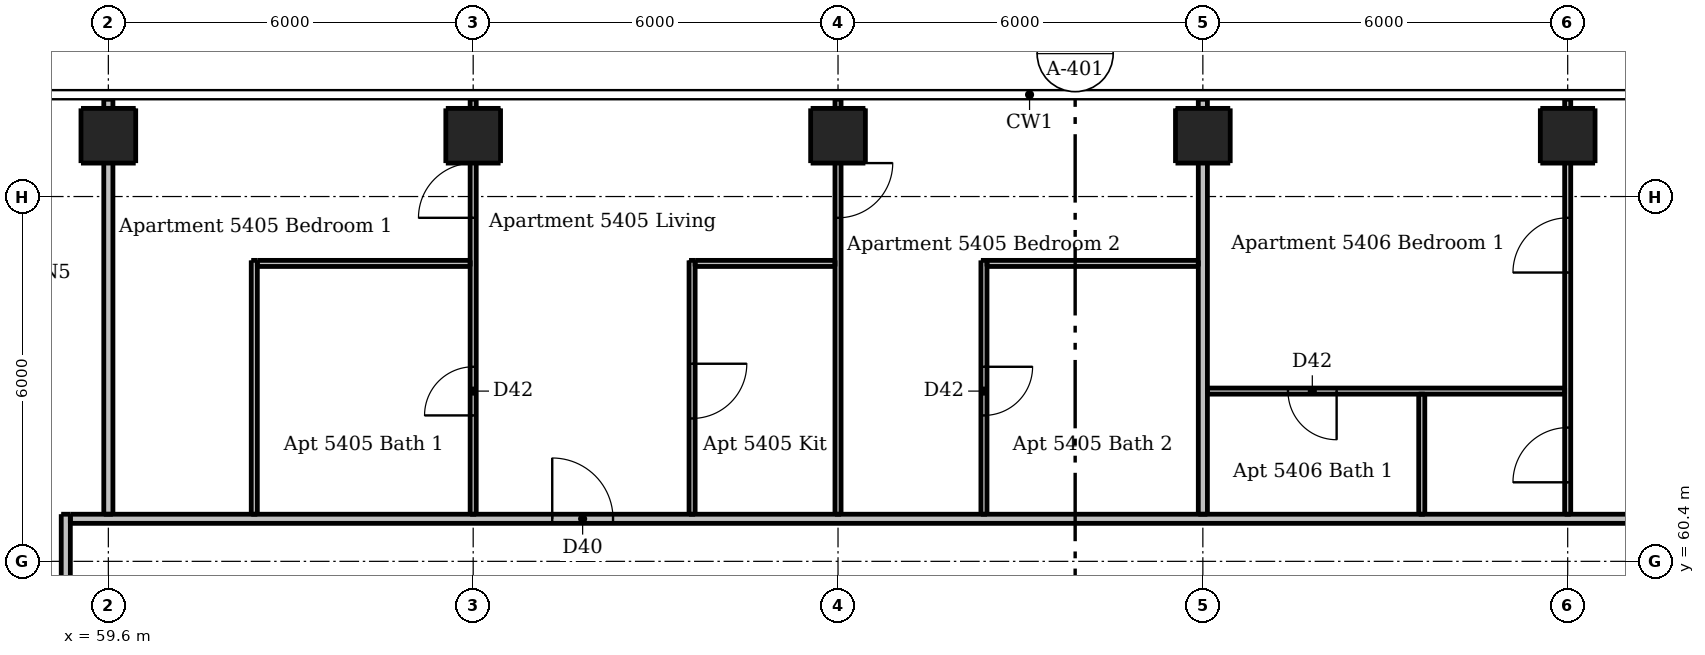
"""IFC4 building model, lengths in metres.
Left out: names, types, materials, properties, quantities, classifications, styles, units other than length and angle.
Written with IfcOpenShell. Run it as: python <this file> out.ifc"""

import sys

from ifc_helpers import new_model, si_unit, direction, frame, frame_2d, origin, origin_2d, place, context, subcontext, project, spatial, rectangle, extrude, element, fill, save


model = new_model("IFC4")
c1 = context("Model", 3, precision=1e-05, world=origin(), true_north=direction((0.0, 1.0)))
c2 = subcontext(c1, "Body", "Model", "MODEL_VIEW")
j1 = project(units=[si_unit("LENGTHUNIT", "METRE"), si_unit("PLANEANGLEUNIT", "RADIAN")], contexts=[c1])
p1 = place(None, origin())
s1 = spatial("IfcSite", under=j1, at=p1, CompositionType="ELEMENT")
p2 = place(p1, origin())
s2 = spatial("IfcBuilding", under=s1, at=p2, CompositionType="ELEMENT")
p3 = place(p2, frame((0.0, 0.0, 203.5)))
s3 = spatial("IfcBuildingStorey", under=s2, at=p3, CompositionType="ELEMENT", Elevation=203.5)
for number, where, z_axis, x_axis in (
    (1, (59.6, 67.4, 0.0), (0.0, 0.0, 1.0), (1.0, 0.0, 0.0)),
    (2, (65.6, 67.4, 0.0), (0.0, 0.0, 1.0), (1.0, 0.0, 0.0)),
    (3, (71.6, 67.4, 0.0), (0.0, 0.0, 1.0), (1.0, 0.0, 0.0)),
    (4, (77.6, 67.4, 0.0), (0.0, 0.0, 1.0), (1.0, 0.0, 0.0)),
    (5, (83.6, 67.4, 0.0), (0.0, 0.0, 1.0), (1.0, 0.0, 0.0)),
):
    element("IfcColumn", number, at=place(p3, frame(where, z_axis=z_axis, x_axis=x_axis)), inside=s3, PredefinedType="COLUMN", context=c2, shape_type="SweptSolid", body=[
        extrude(rectangle(XDim=0.9, YDim=0.9, at=origin_2d()), origin(), (0.0, 0.0, 1.0), 3.05),
    ])
p4 = place(p3, frame((62.0, 61.175, 0.0), z_axis=(0.0, 0.0, 1.0), x_axis=(0.0, 1.0, 0.0)))
e6 = element("IfcWall", 6, at=p4, inside=s3, PredefinedType="PARTITIONING", context=c2, shape_type="SweptSolid", body=[
    extrude(rectangle(XDim=4.175, YDim=0.1, at=frame_2d((2.087, 0.0))), origin(), (0.0, 0.0, 1.0), 3.05),
])
p5 = place(p3, frame((65.6, 61.175, 0.0), z_axis=(0.0, 0.0, 1.0), x_axis=(0.0, 1.0, 0.0)))
e7 = element("IfcWall", 7, at=p5, inside=s3, PredefinedType="PARTITIONING", context=c2, shape_type="SweptSolid", body=[
    extrude(rectangle(XDim=6.825, YDim=0.1, at=frame_2d((3.413, 0.0))), origin(), (0.0, 0.0, 1.0), 2.516),
])
p6 = place(p5, frame((4.875, 0.0, 0.0)))
e8 = element("IfcOpeningElement", 8, at=p6, cuts=e7, PredefinedType="OPENING", context=c2, shape_type="SweptSolid", body=[
    extrude(rectangle(XDim=0.9, YDim=2.1, at=frame_2d((0.45, 1.05))), frame((0.0, 0.06, 0.0), z_axis=(0.0, -1.0, 0.0), x_axis=(1.0, 0.0, 0.0)), (0.0, 0.0, 1.0), 0.12),
])
p7 = place(p5, frame((1.625, 0.0, 0.0)))
e9 = element("IfcOpeningElement", 9, at=p7, cuts=e7, PredefinedType="OPENING", context=c2, shape_type="SweptSolid", body=[
    extrude(rectangle(XDim=0.8, YDim=2.1, at=frame_2d((0.4, 1.05))), frame((0.0, 0.06, 0.0), z_axis=(0.0, -1.0, 0.0), x_axis=(1.0, 0.0, 0.0)), (0.0, 0.0, 1.0), 0.12),
])
p8 = place(p3, frame((69.2, 65.35, 0.0), z_axis=(0.0, 0.0, 1.0), x_axis=(0.0, -1.0, 0.0)))
e10 = element("IfcWall", 10, at=p8, inside=s3, PredefinedType="PARTITIONING", context=c2, shape_type="SweptSolid", body=[
    extrude(rectangle(XDim=4.175, YDim=0.1, at=frame_2d((2.087, 0.0))), origin(), (0.0, 0.0, 1.0), 3.05),
])
p9 = place(p8, frame((1.7, 0.0, 0.0)))
e11 = element("IfcOpeningElement", 11, at=p9, cuts=e10, PredefinedType="OPENING", context=c2, shape_type="SweptSolid", body=[
    extrude(rectangle(XDim=0.9, YDim=2.1, at=frame_2d((0.45, 1.05))), frame((0.0, 0.06, 0.0), z_axis=(0.0, -1.0, 0.0), x_axis=(1.0, 0.0, 0.0)), (0.0, 0.0, 1.0), 0.12),
])
p10 = place(p3, frame((71.6, 68.0, 0.0), z_axis=(0.0, 0.0, 1.0), x_axis=(0.0, -1.0, 0.0)))
e12 = element("IfcWall", 12, at=p10, inside=s3, PredefinedType="PARTITIONING", context=c2, shape_type="SweptSolid", body=[
    extrude(rectangle(XDim=6.825, YDim=0.1, at=frame_2d((3.413, 0.0))), origin(), (0.0, 0.0, 1.0), 2.516),
])
p11 = place(p10, frame((1.05, 0.0, 0.0)))
e13 = element("IfcOpeningElement", 13, at=p11, cuts=e12, PredefinedType="OPENING", context=c2, shape_type="SweptSolid", body=[
    extrude(rectangle(XDim=0.9, YDim=2.1, at=frame_2d((0.45, 1.05))), frame((0.0, 0.06, 0.0), z_axis=(0.0, -1.0, 0.0), x_axis=(1.0, 0.0, 0.0)), (0.0, 0.0, 1.0), 0.12),
])
p12 = place(p3, frame((74.0, 65.35, 0.0), z_axis=(0.0, 0.0, 1.0), x_axis=(0.0, -1.0, 0.0)))
e14 = element("IfcWall", 14, at=p12, inside=s3, PredefinedType="PARTITIONING", context=c2, shape_type="SweptSolid", body=[
    extrude(rectangle(XDim=4.175, YDim=0.1, at=frame_2d((2.087, 0.0))), origin(), (0.0, 0.0, 1.0), 3.05),
])
p13 = place(p12, frame((1.75, 0.0, 0.0)))
e15 = element("IfcOpeningElement", 15, at=p13, cuts=e14, PredefinedType="OPENING", context=c2, shape_type="SweptSolid", body=[
    extrude(rectangle(XDim=0.8, YDim=2.1, at=frame_2d((0.4, 1.05))), frame((0.0, 0.06, 0.0), z_axis=(0.0, -1.0, 0.0), x_axis=(1.0, 0.0, 0.0)), (0.0, 0.0, 1.0), 0.12),
])
p14 = place(p3, frame((81.2, 61.175, 0.0), z_axis=(0.0, 0.0, 1.0), x_axis=(0.0, 1.0, 0.0)))
e16 = element("IfcWall", 16, at=p14, inside=s3, PredefinedType="PARTITIONING", context=c2, shape_type="SweptSolid", body=[
    extrude(rectangle(XDim=1.975, YDim=0.1, at=frame_2d((0.987, 0.0))), origin(), (0.0, 0.0, 1.0), 3.05),
])
p15 = place(p3, frame((83.6, 61.175, 0.0), z_axis=(0.0, 0.0, 1.0), x_axis=(0.0, 1.0, 0.0)))
e17 = element("IfcWall", 17, at=p15, inside=s3, PredefinedType="PARTITIONING", context=c2, shape_type="SweptSolid", body=[
    extrude(rectangle(XDim=6.825, YDim=0.1, at=frame_2d((3.413, 0.0))), origin(), (0.0, 0.0, 1.0), 2.516),
])
p16 = place(p15, frame((0.525, 0.0, 0.0)))
e18 = element("IfcOpeningElement", 18, at=p16, cuts=e17, PredefinedType="OPENING", context=c2, shape_type="SweptSolid", body=[
    extrude(rectangle(XDim=0.9, YDim=2.1, at=frame_2d((0.45, 1.05))), frame((0.0, 0.06, 0.0), z_axis=(0.0, -1.0, 0.0), x_axis=(1.0, 0.0, 0.0)), (0.0, 0.0, 1.0), 0.12),
])
p17 = place(p15, frame((3.975, 0.0, 0.0)))
e19 = element("IfcOpeningElement", 19, at=p17, cuts=e17, PredefinedType="OPENING", context=c2, shape_type="SweptSolid", body=[
    extrude(rectangle(XDim=0.9, YDim=2.1, at=frame_2d((0.45, 1.05))), frame((0.0, 0.06, 0.0), z_axis=(0.0, -1.0, 0.0), x_axis=(1.0, 0.0, 0.0)), (0.0, 0.0, 1.0), 0.12),
])
p18 = place(p3, frame((62.05, 65.3, 0.0), z_axis=(0.0, 0.0, 1.0), x_axis=(1.0, 0.0, 0.0)))
e20 = element("IfcWall", 20, at=p18, inside=s3, PredefinedType="PARTITIONING", context=c2, shape_type="SweptSolid", body=[
    extrude(rectangle(XDim=3.5, YDim=0.1, at=frame_2d((1.75, 0.0))), origin(), (0.0, 0.0, 1.0), 3.05),
])
p19 = place(p3, frame((69.25, 65.3, 0.0), z_axis=(0.0, 0.0, 1.0), x_axis=(1.0, 0.0, 0.0)))
e21 = element("IfcWall", 21, at=p19, inside=s3, PredefinedType="PARTITIONING", context=c2, shape_type="SweptSolid", body=[
    extrude(rectangle(XDim=2.3, YDim=0.1, at=frame_2d((1.15, 0.0))), origin(), (0.0, 0.0, 1.0), 3.05),
])
p20 = place(p3, frame((74.05, 65.3, 0.0), z_axis=(0.0, 0.0, 1.0), x_axis=(1.0, 0.0, 0.0)))
e22 = element("IfcWall", 22, at=p20, inside=s3, PredefinedType="PARTITIONING", context=c2, shape_type="SweptSolid", body=[
    extrude(rectangle(XDim=3.475, YDim=0.1, at=frame_2d((1.737, 0.0))), origin(), (0.0, 0.0, 1.0), 3.05),
])
p21 = place(p3, frame((83.55, 63.2, 0.0), z_axis=(0.0, 0.0, 1.0), x_axis=(-1.0, 0.0, 0.0)))
e23 = element("IfcWall", 23, at=p21, inside=s3, PredefinedType="PARTITIONING", context=c2, shape_type="SweptSolid", body=[
    extrude(rectangle(XDim=5.875, YDim=0.1, at=frame_2d((2.938, 0.0))), origin(), (0.0, 0.0, 1.0), 3.05),
])
p22 = place(p21, frame((3.75, 0.0, 0.0)))
e24 = element("IfcOpeningElement", 24, at=p22, cuts=e23, PredefinedType="OPENING", context=c2, shape_type="SweptSolid", body=[
    extrude(rectangle(XDim=0.8, YDim=2.1, at=frame_2d((0.4, 1.05))), frame((0.0, 0.06, 0.0), z_axis=(0.0, -1.0, 0.0), x_axis=(1.0, 0.0, 0.0)), (0.0, 0.0, 1.0), 0.12),
])
p23 = place(p3, frame((58.9, 30.325, 0.0), z_axis=(0.0, 0.0, 1.0), x_axis=(0.0, 1.0, 0.0)))
e25 = element("IfcWall", 25, at=p23, inside=s3, PredefinedType="PARTITIONING", context=c2, shape_type="SweptSolid", body=[
    extrude(rectangle(XDim=30.85, YDim=0.15, at=frame_2d((15.425, 0.0))), origin(), (0.0, 0.0, 1.0), 3.05),
])
p24 = place(p23, frame((7.375, 0.0, 0.0)))
e26 = element("IfcOpeningElement", 26, at=p24, cuts=e25, PredefinedType="OPENING", context=c2, shape_type="SweptSolid", body=[
    extrude(rectangle(XDim=1.0, YDim=2.1, at=frame_2d((0.5, 1.05))), frame((0.0, 0.085, 0.0), z_axis=(0.0, -1.0, 0.0), x_axis=(1.0, 0.0, 0.0)), (0.0, 0.0, 1.0), 0.17),
])
p25 = place(p23, frame((26.925, 0.0, 0.0)))
e27 = element("IfcOpeningElement", 27, at=p25, cuts=e25, PredefinedType="OPENING", context=c2, shape_type="SweptSolid", body=[
    extrude(rectangle(XDim=1.0, YDim=2.1, at=frame_2d((0.5, 1.05))), frame((0.0, 0.085, 0.0), z_axis=(0.0, -1.0, 0.0), x_axis=(1.0, 0.0, 0.0)), (0.0, 0.0, 1.0), 0.17),
])
p26 = place(p3, frame((59.6, 61.175, 0.0), z_axis=(0.0, 0.0, 1.0), x_axis=(0.0, 1.0, 0.0)))
e28 = element("IfcWall", 28, at=p26, inside=s3, PredefinedType="PARTITIONING", context=c2, shape_type="SweptSolid", body=[
    extrude(rectangle(XDim=6.825, YDim=0.15, at=frame_2d((3.413, 0.0))), origin(), (0.0, 0.0, 1.0), 2.51),
])
p27 = place(p3, frame((77.6, 61.175, 0.0), z_axis=(0.0, 0.0, 1.0), x_axis=(0.0, 1.0, 0.0)))
e29 = element("IfcWall", 29, at=p27, inside=s3, PredefinedType="PARTITIONING", context=c2, shape_type="SweptSolid", body=[
    extrude(rectangle(XDim=6.825, YDim=0.15, at=frame_2d((3.413, 0.0))), origin(), (0.0, 0.0, 1.0), 2.516),
])
p28 = place(p3, frame((58.975, 61.1, 0.0), z_axis=(0.0, 0.0, 1.0), x_axis=(1.0, 0.0, 0.0)))
e30 = element("IfcWall", 30, at=p28, inside=s3, PredefinedType="PARTITIONING", context=c2, shape_type="SweptSolid", body=[
    extrude(rectangle(XDim=29.25, YDim=0.15, at=frame_2d((14.625, 0.0))), origin(), (0.0, 0.0, 1.0), 3.05),
])
p29 = place(p28, frame((7.925, 0.0, 0.0)))
e31 = element("IfcOpeningElement", 31, at=p29, cuts=e30, PredefinedType="OPENING", context=c2, shape_type="SweptSolid", body=[
    extrude(rectangle(XDim=1.0, YDim=2.1, at=frame_2d((0.5, 1.05))), frame((0.0, 0.085, 0.0), z_axis=(0.0, -1.0, 0.0), x_axis=(1.0, 0.0, 0.0)), (0.0, 0.0, 1.0), 0.17),
])
p30 = place(p28, frame((26.475, 0.0, 0.0)))
e32 = element("IfcOpeningElement", 32, at=p30, cuts=e30, PredefinedType="OPENING", context=c2, shape_type="SweptSolid", body=[
    extrude(rectangle(XDim=1.0, YDim=2.1, at=frame_2d((0.5, 1.05))), frame((0.0, 0.085, 0.0), z_axis=(0.0, -1.0, 0.0), x_axis=(1.0, 0.0, 0.0)), (0.0, 0.0, 1.0), 0.17),
])
p31 = place(p29, origin())
e33 = element("IfcDoor", 33, at=p31, inside=s3, OperationType="SINGLE_SWING_LEFT", PredefinedType="DOOR", context=c2, shape_type="SweptSolid", body=[
    extrude(rectangle(XDim=1.0, YDim=2.1, at=frame_2d((0.5, 1.05))), frame((0.0, 0.025, 0.0), z_axis=(0.0, -1.0, 0.0), x_axis=(1.0, 0.0, 0.0)), (0.0, 0.0, 1.0), 0.05),
])
fill(e31, e33)
p32 = place(p9, origin())
e34 = element("IfcDoor", 34, at=p32, inside=s3, OperationType="SINGLE_SWING_LEFT", PredefinedType="DOOR", context=c2, shape_type="SweptSolid", body=[
    extrude(rectangle(XDim=0.9, YDim=2.1, at=frame_2d((0.45, 1.05))), frame((0.0, 0.025, 0.0), z_axis=(0.0, -1.0, 0.0), x_axis=(1.0, 0.0, 0.0)), (0.0, 0.0, 1.0), 0.05),
])
fill(e11, e34)
p33 = place(p6, origin())
e35 = element("IfcDoor", 35, at=p33, inside=s3, OperationType="SINGLE_SWING_LEFT", PredefinedType="DOOR", context=c2, shape_type="SweptSolid", body=[
    extrude(rectangle(XDim=0.9, YDim=2.1, at=frame_2d((0.45, 1.05))), frame((0.0, 0.025, 0.0), z_axis=(0.0, -1.0, 0.0), x_axis=(1.0, 0.0, 0.0)), (0.0, 0.0, 1.0), 0.05),
])
fill(e8, e35)
p34 = place(p7, origin())
e36 = element("IfcDoor", 36, at=p34, inside=s3, OperationType="SINGLE_SWING_LEFT", PredefinedType="DOOR", context=c2, shape_type="SweptSolid", body=[
    extrude(rectangle(XDim=0.8, YDim=2.1, at=frame_2d((0.4, 1.05))), frame((0.0, 0.025, 0.0), z_axis=(0.0, -1.0, 0.0), x_axis=(1.0, 0.0, 0.0)), (0.0, 0.0, 1.0), 0.05),
])
fill(e9, e36)
p35 = place(p11, origin())
e37 = element("IfcDoor", 37, at=p35, inside=s3, OperationType="SINGLE_SWING_LEFT", PredefinedType="DOOR", context=c2, shape_type="SweptSolid", body=[
    extrude(rectangle(XDim=0.9, YDim=2.1, at=frame_2d((0.45, 1.05))), frame((0.0, 0.025, 0.0), z_axis=(0.0, -1.0, 0.0), x_axis=(1.0, 0.0, 0.0)), (0.0, 0.0, 1.0), 0.05),
])
fill(e13, e37)
p36 = place(p13, origin())
e38 = element("IfcDoor", 38, at=p36, inside=s3, OperationType="SINGLE_SWING_LEFT", PredefinedType="DOOR", context=c2, shape_type="SweptSolid", body=[
    extrude(rectangle(XDim=0.8, YDim=2.1, at=frame_2d((0.4, 1.05))), frame((0.0, 0.025, 0.0), z_axis=(0.0, -1.0, 0.0), x_axis=(1.0, 0.0, 0.0)), (0.0, 0.0, 1.0), 0.05),
])
fill(e15, e38)
p37 = place(p16, origin())
e39 = element("IfcDoor", 39, at=p37, inside=s3, OperationType="SINGLE_SWING_LEFT", PredefinedType="DOOR", context=c2, shape_type="SweptSolid", body=[
    extrude(rectangle(XDim=0.9, YDim=2.1, at=frame_2d((0.45, 1.05))), frame((0.0, 0.025, 0.0), z_axis=(0.0, -1.0, 0.0), x_axis=(1.0, 0.0, 0.0)), (0.0, 0.0, 1.0), 0.05),
])
fill(e18, e39)
p38 = place(p17, origin())
e40 = element("IfcDoor", 40, at=p38, inside=s3, OperationType="SINGLE_SWING_LEFT", PredefinedType="DOOR", context=c2, shape_type="SweptSolid", body=[
    extrude(rectangle(XDim=0.9, YDim=2.1, at=frame_2d((0.45, 1.05))), frame((0.0, 0.025, 0.0), z_axis=(0.0, -1.0, 0.0), x_axis=(1.0, 0.0, 0.0)), (0.0, 0.0, 1.0), 0.05),
])
fill(e19, e40)
p39 = place(p22, origin())
e41 = element("IfcDoor", 41, at=p39, inside=s3, OperationType="SINGLE_SWING_LEFT", PredefinedType="DOOR", context=c2, shape_type="SweptSolid", body=[
    extrude(rectangle(XDim=0.8, YDim=2.1, at=frame_2d((0.4, 1.05))), frame((0.0, 0.025, 0.0), z_axis=(0.0, -1.0, 0.0), x_axis=(1.0, 0.0, 0.0)), (0.0, 0.0, 1.0), 0.05),
])
fill(e24, e41)
save(model, sys.argv[1])
